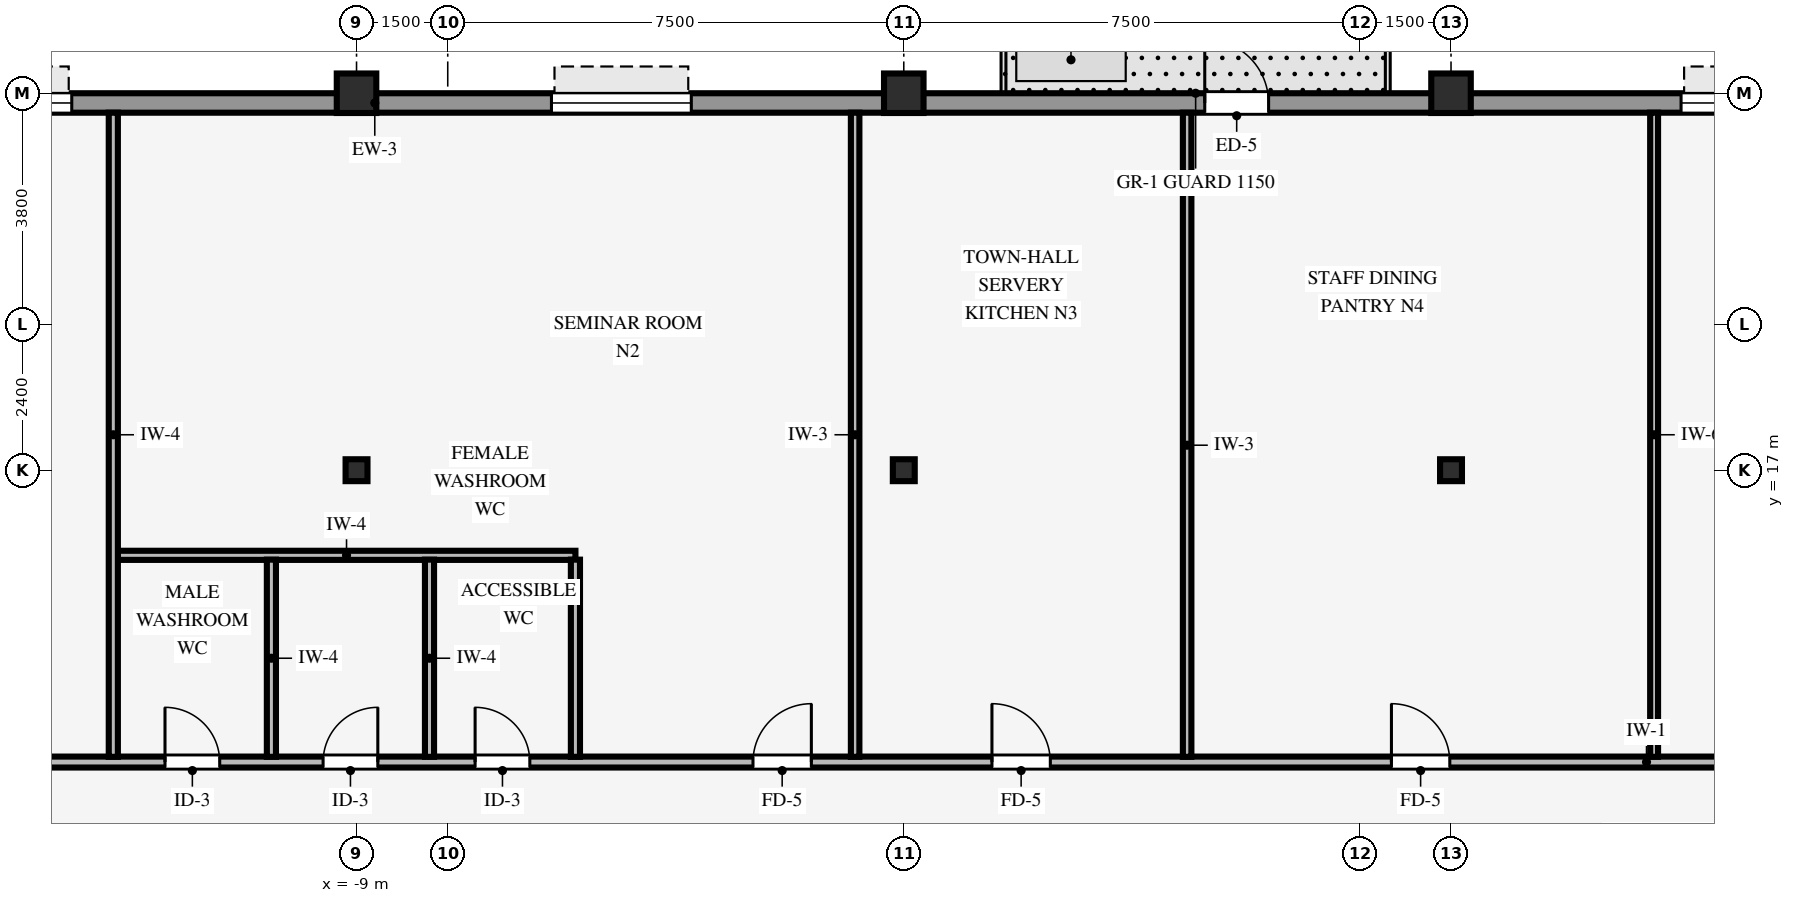
"""IFC4 building model, lengths in metres.
Left out: names, types, materials, properties, quantities, classifications, styles, units other than length and angle.
Written with IfcOpenShell. Run it as: python <this file> out.ifc"""

import sys

from ifc_helpers import new_model, si_unit, direction, frame, frame_2d, origin, origin_2d, place, context, subcontext, project, spatial, rectangle, hollow_rectangle, i_section, extrude, source, transform, mapped, element, fill, save


model = new_model("IFC4")
c1 = context("Model", 3, precision=1e-05, world=origin(), true_north=direction((0.0, 1.0)))
c2 = subcontext(c1, "Body", "Model", "MODEL_VIEW")
j1 = project(units=[si_unit("LENGTHUNIT", "METRE"), si_unit("PLANEANGLEUNIT", "RADIAN")], contexts=[c1])
p1 = place(None, origin())
s1 = spatial("IfcSite", under=j1, at=p1, CompositionType="ELEMENT")
p2 = place(p1, origin())
s2 = spatial("IfcBuilding", under=s1, at=p2, CompositionType="ELEMENT")
p3 = place(p2, frame((0.0, 0.0, 105.6)))
s3 = spatial("IfcBuildingStorey", under=s2, at=p3, CompositionType="ELEMENT", Elevation=105.6)
for number, where, z_axis, x_axis in (
    (1, (-9.0, 23.2, 0.0), (0.0, 0.0, 1.0), (1.0, 0.0, 0.0)),
    (2, (0.0, 23.2, 0.0), (0.0, 0.0, 1.0), (1.0, 0.0, 0.0)),
    (3, (9.0, 23.2, 0.0), (0.0, 0.0, 1.0), (1.0, 0.0, 0.0)),
):
    element("IfcColumn", number, at=place(p3, frame(where, z_axis=z_axis, x_axis=x_axis)), inside=s3, PredefinedType="COLUMN", context=c2, shape_type="SweptSolid", body=[
        extrude(hollow_rectangle(XDim=0.65, YDim=0.65, WallThickness=0.04, InnerFilletRadius=0.04, OuterFilletRadius=0.08, at=origin_2d()), origin(), (0.0, 0.0, 1.0), 3.37),
    ])
for number, where, z_axis, x_axis in (
    (4, (0.0, 17.0, 0.0), (0.0, 0.0, 1.0), (1.0, 0.0, 0.0)),
    (5, (-9.0, 17.0, 0.0), (0.0, 0.0, 1.0), (1.0, 0.0, 0.0)),
    (6, (9.0, 17.0, 0.0), (0.0, 0.0, 1.0), (1.0, 0.0, 0.0)),
):
    element("IfcColumn", number, at=place(p3, frame(where, z_axis=z_axis, x_axis=x_axis)), inside=s3, PredefinedType="COLUMN", context=c2, shape_type="SweptSolid", body=[
        extrude(i_section(OverallWidth=0.36, OverallDepth=0.36, WebThickness=0.021, FlangeThickness=0.021, FilletRadius=0.018, at=origin_2d()), origin(), (0.0, 0.0, 1.0), 3.37),
    ])
p4 = place(p3, frame((-21.9, 23.04, 0.0), z_axis=(0.0, 0.0, 1.0), x_axis=(1.0, 0.0, 0.0)))
e7 = element("IfcWall", 7, at=p4, inside=s3, PredefinedType="STANDARD", context=c2, shape_type="SweptSolid", body=[
    extrude(rectangle(XDim=43.8, YDim=0.32, at=frame_2d((21.9, 0.0))), origin(), (0.0, 0.0, 1.0), 2.705),
])
p5 = place(p4, frame((26.85, 0.0, 0.0)))
e8 = element("IfcOpeningElement", 8, at=p5, cuts=e7, PredefinedType="OPENING", context=c2, shape_type="SweptSolid", body=[
    extrude(rectangle(XDim=1.05, YDim=2.1, at=frame_2d((0.525, 1.05))), frame((0.0, 0.17, 0.0), z_axis=(0.0, -1.0, 0.0), x_axis=(1.0, 0.0, 0.0)), (0.0, 0.0, 1.0), 0.34),
])
p6 = place(p4, frame((2.172, 0.0, 0.8)))
e9 = element("IfcOpeningElement", 9, at=p6, cuts=e7, PredefinedType="OPENING", context=c2, shape_type="SweptSolid", body=[
    extrude(rectangle(XDim=2.3, YDim=1.62, at=frame_2d((1.15, 0.81))), frame((0.0, 0.17, 0.0), z_axis=(0.0, -1.0, 0.0), x_axis=(1.0, 0.0, 0.0)), (0.0, 0.0, 1.0), 0.34),
])
p7 = place(p4, frame((5.917, 0.0, 0.8)))
e10 = element("IfcOpeningElement", 10, at=p7, cuts=e7, PredefinedType="OPENING", context=c2, shape_type="SweptSolid", body=[
    extrude(rectangle(XDim=2.3, YDim=1.62, at=frame_2d((1.15, 0.81))), frame((0.0, 0.17, 0.0), z_axis=(0.0, -1.0, 0.0), x_axis=(1.0, 0.0, 0.0)), (0.0, 0.0, 1.0), 0.34),
])
p8 = place(p4, frame((16.106, 0.0, 0.8)))
e11 = element("IfcOpeningElement", 11, at=p8, cuts=e7, PredefinedType="OPENING", context=c2, shape_type="SweptSolid", body=[
    extrude(rectangle(XDim=2.3, YDim=1.62, at=frame_2d((1.15, 0.81))), frame((0.0, 0.17, 0.0), z_axis=(0.0, -1.0, 0.0), x_axis=(1.0, 0.0, 0.0)), (0.0, 0.0, 1.0), 0.34),
])
p9 = place(p4, frame((34.683, 0.0, 0.8)))
e12 = element("IfcOpeningElement", 12, at=p9, cuts=e7, PredefinedType="OPENING", context=c2, shape_type="SweptSolid", body=[
    extrude(rectangle(XDim=2.3, YDim=1.62, at=frame_2d((1.15, 0.81))), frame((0.0, 0.17, 0.0), z_axis=(0.0, -1.0, 0.0), x_axis=(1.0, 0.0, 0.0)), (0.0, 0.0, 1.0), 0.34),
])
p10 = place(p4, frame((39.328, 0.0, 0.8)))
e13 = element("IfcOpeningElement", 13, at=p10, cuts=e7, PredefinedType="OPENING", context=c2, shape_type="SweptSolid", body=[
    extrude(rectangle(XDim=2.3, YDim=1.62, at=frame_2d((1.15, 0.81))), frame((0.0, 0.17, 0.0), z_axis=(0.0, -1.0, 0.0), x_axis=(1.0, 0.0, 0.0)), (0.0, 0.0, 1.0), 0.34),
])
p11 = place(p3, frame((-15.0, 12.2, 0.0), z_axis=(0.0, 0.0, 1.0), x_axis=(1.0, 0.0, 0.0)))
e14 = element("IfcWall", 14, at=p11, inside=s3, PredefinedType="PARTITIONING", context=c2, shape_type="SweptSolid", body=[
    extrude(rectangle(XDim=30.0, YDim=0.18, at=frame_2d((15.0, 0.0))), origin(), (0.0, 0.0, 1.0), 3.36),
])
p12 = place(p11, frame((23.02, 0.0, 0.0)))
e15 = element("IfcOpeningElement", 15, at=p12, cuts=e14, PredefinedType="OPENING", context=c2, shape_type="SweptSolid", body=[
    extrude(rectangle(XDim=0.96, YDim=2.1, at=frame_2d((0.48, 1.05))), frame((0.0, 0.1, 0.0), z_axis=(0.0, -1.0, 0.0), x_axis=(1.0, 0.0, 0.0)), (0.0, 0.0, 1.0), 0.2),
])
p13 = place(p11, frame((16.45, 0.0, 0.0)))
e16 = element("IfcOpeningElement", 16, at=p13, cuts=e14, PredefinedType="OPENING", context=c2, shape_type="SweptSolid", body=[
    extrude(rectangle(XDim=0.96, YDim=2.1, at=frame_2d((0.48, 1.05))), frame((0.0, 0.1, 0.0), z_axis=(0.0, -1.0, 0.0), x_axis=(1.0, 0.0, 0.0)), (0.0, 0.0, 1.0), 0.2),
])
p14 = place(p11, frame((5.45, 0.0, 0.0)))
e17 = element("IfcOpeningElement", 17, at=p14, cuts=e14, PredefinedType="OPENING", context=c2, shape_type="SweptSolid", body=[
    extrude(rectangle(XDim=0.9, YDim=2.1, at=frame_2d((0.45, 1.05))), frame((0.0, 0.1, 0.0), z_axis=(0.0, -1.0, 0.0), x_axis=(1.0, 0.0, 0.0)), (0.0, 0.0, 1.0), 0.2),
])
p15 = place(p11, frame((2.85, 0.0, 0.0)))
e18 = element("IfcOpeningElement", 18, at=p15, cuts=e14, PredefinedType="OPENING", context=c2, shape_type="SweptSolid", body=[
    extrude(rectangle(XDim=0.9, YDim=2.1, at=frame_2d((0.45, 1.05))), frame((0.0, 0.1, 0.0), z_axis=(0.0, -1.0, 0.0), x_axis=(1.0, 0.0, 0.0)), (0.0, 0.0, 1.0), 0.2),
])
p16 = place(p11, frame((12.52, 0.0, 0.0)))
e19 = element("IfcOpeningElement", 19, at=p16, cuts=e14, PredefinedType="OPENING", context=c2, shape_type="SweptSolid", body=[
    extrude(rectangle(XDim=0.96, YDim=2.1, at=frame_2d((0.48, 1.05))), frame((0.0, 0.1, 0.0), z_axis=(0.0, -1.0, 0.0), x_axis=(1.0, 0.0, 0.0)), (0.0, 0.0, 1.0), 0.2),
])
p17 = place(p11, frame((7.95, 0.0, 0.0)))
e20 = element("IfcOpeningElement", 20, at=p17, cuts=e14, PredefinedType="OPENING", context=c2, shape_type="SweptSolid", body=[
    extrude(rectangle(XDim=0.9, YDim=2.1, at=frame_2d((0.45, 1.05))), frame((0.0, 0.1, 0.0), z_axis=(0.0, -1.0, 0.0), x_axis=(1.0, 0.0, 0.0)), (0.0, 0.0, 1.0), 0.2),
])
p18 = place(p3, frame((-12.929, 15.6, 0.0), z_axis=(0.0, 0.0, 1.0), x_axis=(1.0, 0.0, 0.0)))
e21 = element("IfcWall", 21, at=p18, inside=s3, PredefinedType="PARTITIONING", context=c2, shape_type="SweptSolid", body=[
    extrude(rectangle(XDim=7.529, YDim=0.15, at=frame_2d((3.765, 0.0))), origin(), (0.0, 0.0, 1.0), 3.36),
])
p19 = place(p3, frame((-13.0, 12.286, 0.0), z_axis=(0.0, 0.0, 1.0), x_axis=(0.0, 1.0, 0.0)))
e22 = element("IfcWall", 22, at=p19, inside=s3, PredefinedType="PARTITIONING", context=c2, shape_type="SweptSolid", body=[
    extrude(rectangle(XDim=10.594, YDim=0.15, at=frame_2d((5.297, 0.0))), origin(), (0.0, 0.0, 1.0), 3.36),
])
for number, where, z_axis, x_axis in (
    (23, (-10.4, 12.286, 0.0), (0.0, 0.0, 1.0), (0.0, 1.0, 0.0)),
    (24, (-7.8, 12.286, 0.0), (0.0, 0.0, 1.0), (0.0, 1.0, 0.0)),
    (25, (-5.4, 12.286, 0.0), (0.0, 0.0, 1.0), (0.0, 1.0, 0.0)),
):
    element("IfcWall", number, at=place(p3, frame(where, z_axis=z_axis, x_axis=x_axis)), inside=s3, PredefinedType="PARTITIONING", context=c2, shape_type="SweptSolid", body=[
        extrude(rectangle(XDim=3.243, YDim=0.15, at=frame_2d((1.622, 0.0))), origin(), (0.0, 0.0, 1.0), 3.36),
    ])
for number, where, z_axis, x_axis in (
    (26, (-0.8, 12.286, 0.0), (0.0, 0.0, 1.0), (0.0, 1.0, 0.0)),
    (27, (4.66, 12.286, 0.0), (0.0, 0.0, 1.0), (0.0, 1.0, 0.0)),
):
    element("IfcWall", number, at=place(p3, frame(where, z_axis=z_axis, x_axis=x_axis)), inside=s3, PredefinedType="PARTITIONING", context=c2, shape_type="SweptSolid", body=[
        extrude(rectangle(XDim=10.594, YDim=0.14, at=frame_2d((5.297, 0.0))), origin(), (0.0, 0.0, 1.0), 3.36),
    ])
p20 = place(p3, frame((12.34, 12.286, 0.0), z_axis=(0.0, 0.0, 1.0), x_axis=(0.0, 1.0, 0.0)))
e28 = element("IfcWall", 28, at=p20, inside=s3, PredefinedType="PARTITIONING", context=c2, shape_type="SweptSolid", body=[
    extrude(rectangle(XDim=10.594, YDim=0.13, at=frame_2d((5.297, 0.0))), origin(), (0.0, 0.0, 1.0), 3.36),
])
m1 = source(origin(), c2, "Body", "SweptSolid", [
    extrude(rectangle(XDim=1.05, YDim=2.1, at=frame_2d((0.525, 1.05))), frame((0.0, 0.025, 0.0), z_axis=(0.0, -1.0, 0.0), x_axis=(1.0, 0.0, 0.0)), (0.0, 0.0, 1.0), 0.05),
])
p21 = place(p5, origin())
e29 = element("IfcDoor", 29, at=p21, inside=s3, OperationType="SINGLE_SWING_LEFT", PredefinedType="DOOR", context=c2, shape_type="MappedRepresentation", body=[
    mapped(m1, transform((0.0, 0.0, 0.0), scale=1.0)),
])
fill(e8, e29)
m2 = source(origin(), c2, "Body", "SweptSolid", [
    extrude(rectangle(XDim=2.3, YDim=1.62, at=frame_2d((1.15, 0.81))), frame((0.0, 0.03, 0.0), z_axis=(0.0, -1.0, 0.0), x_axis=(1.0, 0.0, 0.0)), (0.0, 0.0, 1.0), 0.06),
])
p22 = place(p7, origin())
e30 = element("IfcWindow", 30, at=p22, inside=s3, PartitioningType="SINGLE_PANEL", PredefinedType="WINDOW", context=c2, shape_type="MappedRepresentation", body=[
    mapped(m2, transform((0.0, 0.0, 0.0), scale=1.0)),
])
fill(e10, e30)
p23 = place(p8, origin())
e31 = element("IfcWindow", 31, at=p23, inside=s3, PartitioningType="SINGLE_PANEL", PredefinedType="WINDOW", context=c2, shape_type="MappedRepresentation", body=[
    mapped(m2, transform((0.0, 0.0, 0.0), scale=1.0)),
])
fill(e11, e31)
p24 = place(p9, origin())
e32 = element("IfcWindow", 32, at=p24, inside=s3, PartitioningType="SINGLE_PANEL", PredefinedType="WINDOW", context=c2, shape_type="MappedRepresentation", body=[
    mapped(m2, transform((0.0, 0.0, 0.0), scale=1.0)),
])
fill(e12, e32)
m3 = source(origin(), c2, "Body", "SweptSolid", [
    extrude(rectangle(XDim=0.96, YDim=2.1, at=frame_2d((0.48, 1.05))), frame((0.0, 0.025, 0.0), z_axis=(0.0, -1.0, 0.0), x_axis=(1.0, 0.0, 0.0)), (0.0, 0.0, 1.0), 0.05),
])
p25 = place(p12, origin())
e33 = element("IfcDoor", 33, at=p25, inside=s3, OperationType="SINGLE_SWING_LEFT", PredefinedType="DOOR", context=c2, shape_type="MappedRepresentation", body=[
    mapped(m3, transform((0.0, 0.0, 0.0), scale=1.0)),
])
fill(e15, e33)
p26 = place(p13, origin())
e34 = element("IfcDoor", 34, at=p26, inside=s3, OperationType="SINGLE_SWING_LEFT", PredefinedType="DOOR", context=c2, shape_type="MappedRepresentation", body=[
    mapped(m3, transform((0.0, 0.0, 0.0), scale=1.0)),
])
fill(e16, e34)
m4 = source(origin(), c2, "Body", "SweptSolid", [
    extrude(rectangle(XDim=0.9, YDim=2.1, at=frame_2d((0.45, 1.05))), frame((0.0, 0.025, 0.0), z_axis=(0.0, -1.0, 0.0), x_axis=(1.0, 0.0, 0.0)), (0.0, 0.0, 1.0), 0.05),
])
p27 = place(p14, origin())
e35 = element("IfcDoor", 35, at=p27, inside=s3, OperationType="SINGLE_SWING_RIGHT", PredefinedType="DOOR", context=c2, shape_type="MappedRepresentation", body=[
    mapped(m4, transform((0.0, 0.0, 0.0), scale=1.0)),
])
fill(e17, e35)
p28 = place(p15, origin())
e36 = element("IfcDoor", 36, at=p28, inside=s3, OperationType="SINGLE_SWING_LEFT", PredefinedType="DOOR", context=c2, shape_type="MappedRepresentation", body=[
    mapped(m4, transform((0.0, 0.0, 0.0), scale=1.0)),
])
fill(e18, e36)
p29 = place(p16, origin())
e37 = element("IfcDoor", 37, at=p29, inside=s3, OperationType="SINGLE_SWING_RIGHT", PredefinedType="DOOR", context=c2, shape_type="MappedRepresentation", body=[
    mapped(m3, transform((0.0, 0.0, 0.0), scale=1.0)),
])
fill(e19, e37)
p30 = place(p17, origin())
e38 = element("IfcDoor", 38, at=p30, inside=s3, OperationType="SINGLE_SWING_LEFT", PredefinedType="DOOR", context=c2, shape_type="MappedRepresentation", body=[
    mapped(m4, transform((0.0, 0.0, 0.0), scale=1.0)),
])
fill(e20, e38)
save(model, sys.argv[1])
